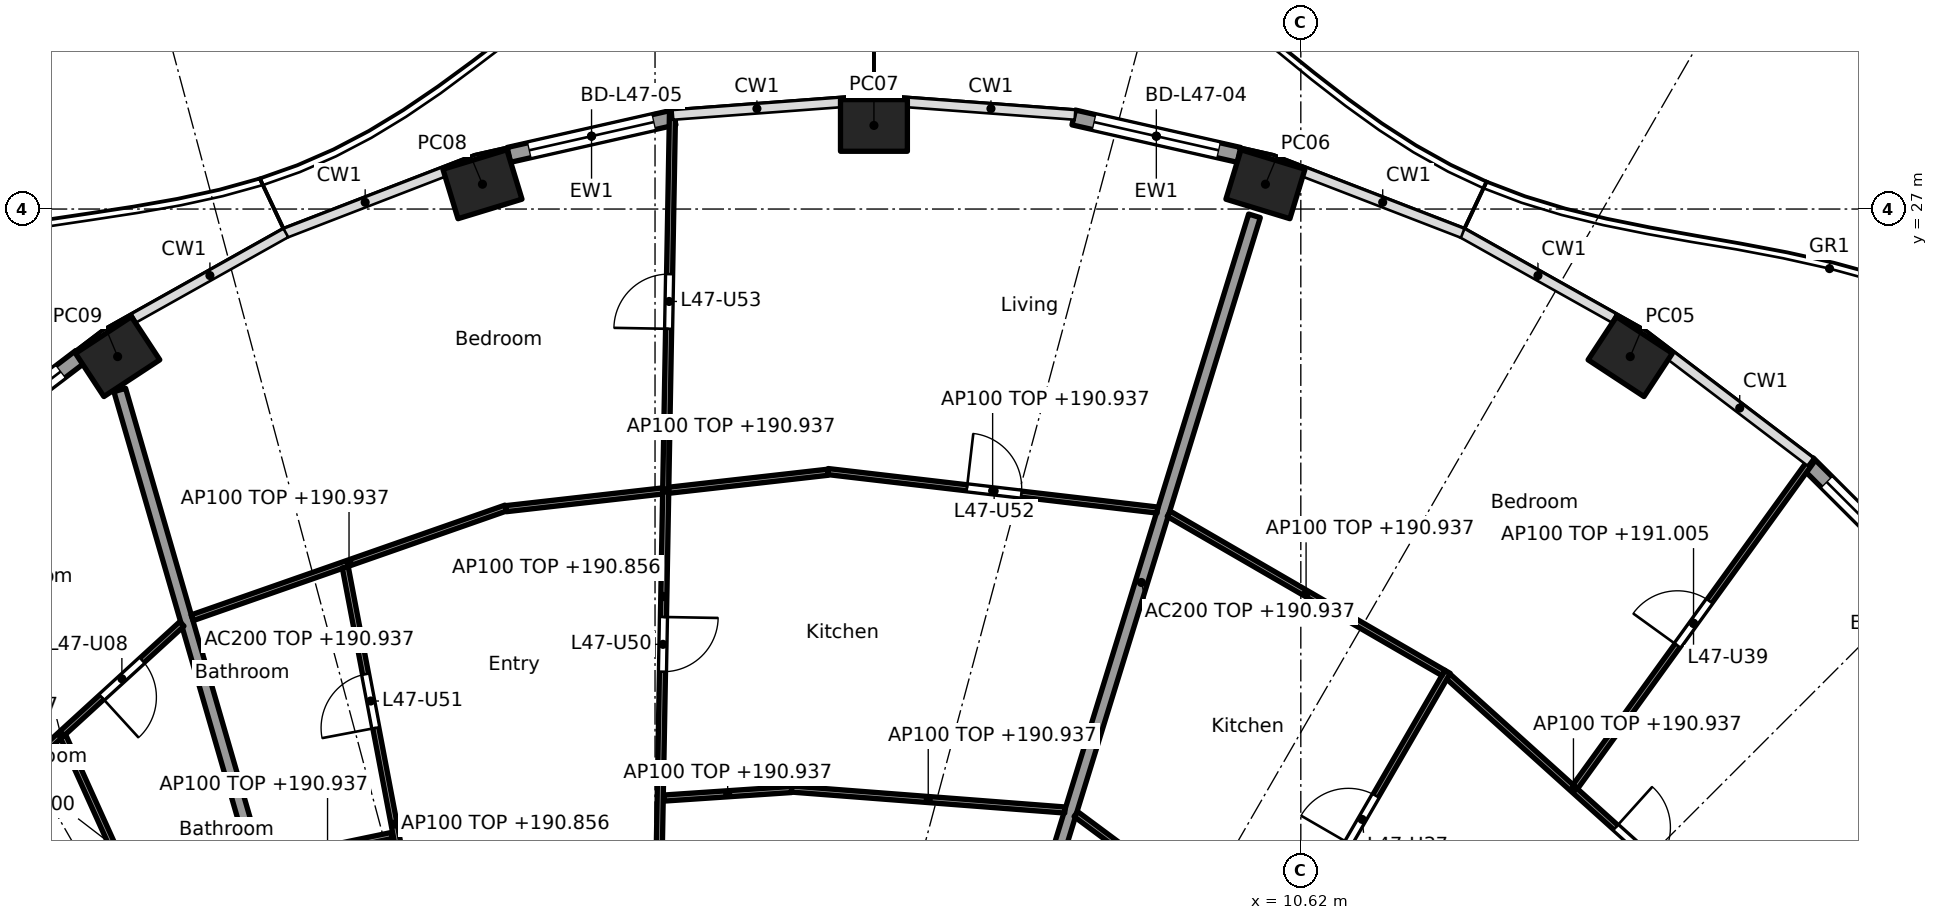
"""IFC4 building model, lengths in metres.
Left out: names, types, materials, properties, quantities, classifications, styles, units other than length and angle.
Written with IfcOpenShell. Run it as: python <this file> out.ifc"""

import sys

from ifc_helpers import new_model, si_unit, direction, frame, frame_2d, origin, origin_2d, place, context, subcontext, project, spatial, rectangle, hollow_rectangle, extrude, element, fill, save


model = new_model("IFC4")
c1 = context("Model", 3, precision=1e-05, world=origin(), true_north=direction((0.0, 1.0)))
c2 = subcontext(c1, "Body", "Model", "MODEL_VIEW")
j1 = project(units=[si_unit("LENGTHUNIT", "METRE"), si_unit("PLANEANGLEUNIT", "RADIAN")], contexts=[c1])
p1 = place(None, origin())
s1 = spatial("IfcSite", under=j1, at=p1, CompositionType="ELEMENT")
p2 = place(p1, origin())
s2 = spatial("IfcBuilding", under=s1, at=p2, CompositionType="ELEMENT")
p3 = place(p2, frame((0.0, 0.0, 188.1)))
s3 = spatial("IfcBuildingStorey", under=s2, at=p3, CompositionType="ELEMENT", Elevation=188.1)
for number, where, z_axis, x_axis in (
    (1, (16.038, 24.573, 0.0), (0.0, 0.0, 1.0), (-0.836, 0.549, 0.0)),
    (2, (10.038, 27.408, 0.0), (0.0, 0.0, 1.0), (-0.957, 0.292, 0.0)),
    (3, (3.6, 28.375, 0.0), (0.0, 0.0, 1.0), (-1.0, 0.0, 0.0)),
    (4, (-2.838, 27.408, 0.0), (0.0, 0.0, 1.0), (-0.957, -0.292, 0.0)),
    (5, (-8.837, 24.573, 0.0), (0.0, 0.0, 1.0), (-0.836, -0.549, 0.0)),
):
    element("IfcColumn", number, at=place(p3, frame(where, z_axis=z_axis, x_axis=x_axis)), inside=s3, PredefinedType="COLUMN", context=c2, shape_type="SweptSolid", body=[
        extrude(hollow_rectangle(XDim=1.1, YDim=0.85, WallThickness=0.036, at=origin_2d()), origin(), (0.0, 0.0, 1.0), 3.7),
    ])
p4 = place(p3, frame((18.959, 22.82, 0.0), z_axis=(0.0, 0.0, 1.0), x_axis=(0.707844845069, -0.706367946122, 0.0)))
e6 = element("IfcWall", 6, at=p4, inside=s3, PredefinedType="SOLIDWALL", context=c2, shape_type="SweptSolid", body=[
    extrude(rectangle(XDim=2.976, YDim=0.25, at=frame_2d((1.488, 0.0))), origin(), (0.0, 0.0, 1.0), 3.44),
])
p5 = place(p4, frame((0.438, 0.0, 0.0)))
e7 = element("IfcOpeningElement", 7, at=p5, cuts=e6, PredefinedType="OPENING", context=c2, shape_type="SweptSolid", body=[
    extrude(rectangle(XDim=2.1, YDim=2.4, at=frame_2d((1.05, 1.2))), frame((0.0, 0.135, 0.0), z_axis=(0.0, -1.0, 0.0), x_axis=(1.0, 0.0, 0.0)), (0.0, 0.0, 1.0), 0.27),
])
p6 = place(p3, frame((6.885, 28.506, 0.0), z_axis=(0.0, 0.0, 1.0), x_axis=(0.975324329911, -0.220776926974, 0.0)))
e8 = element("IfcWall", 8, at=p6, inside=s3, PredefinedType="SOLIDWALL", context=c2, shape_type="SweptSolid", body=[
    extrude(rectangle(XDim=2.788, YDim=0.25, at=frame_2d((1.394, 0.0))), origin(), (0.0, 0.0, 1.0), 3.44),
])
p7 = place(p6, frame((0.344, 0.0, 0.0)))
e9 = element("IfcOpeningElement", 9, at=p7, cuts=e8, PredefinedType="OPENING", context=c2, shape_type="SweptSolid", body=[
    extrude(rectangle(XDim=2.1, YDim=2.4, at=frame_2d((1.05, 1.2))), frame((0.0, 0.135, 0.0), z_axis=(0.0, -1.0, 0.0), x_axis=(1.0, 0.0, 0.0)), (0.0, 0.0, 1.0), 0.27),
])
p8 = place(p3, frame((-2.404, 27.891, 0.0), z_axis=(0.0, 0.0, 1.0), x_axis=(0.975324329911, 0.220776926974, 0.0)))
e10 = element("IfcWall", 10, at=p8, inside=s3, PredefinedType="SOLIDWALL", context=c2, shape_type="SweptSolid", body=[
    extrude(rectangle(XDim=2.788, YDim=0.25, at=frame_2d((1.394, 0.0))), origin(), (0.0, 0.0, 1.0), 3.44),
])
p9 = place(p8, frame((0.344, 0.0, 0.0)))
e11 = element("IfcOpeningElement", 11, at=p9, cuts=e10, PredefinedType="OPENING", context=c2, shape_type="SweptSolid", body=[
    extrude(rectangle(XDim=2.1, YDim=2.4, at=frame_2d((1.05, 1.2))), frame((0.0, 0.135, 0.0), z_axis=(0.0, -1.0, 0.0), x_axis=(1.0, 0.0, 0.0)), (0.0, 0.0, 1.0), 0.27),
])
p10 = place(p3, frame((-11.772, 22.809, 0.0), z_axis=(0.0, 0.0, 1.0), x_axis=(0.796055733703, 0.60522332146, 0.0)))
e12 = element("IfcWall", 12, at=p10, inside=s3, PredefinedType="SOLIDWALL", context=c2, shape_type="SweptSolid", body=[
    extrude(rectangle(XDim=2.917, YDim=0.25, at=frame_2d((1.458, 0.0))), origin(), (0.0, 0.0, 1.0), 3.44),
])
p11 = place(p10, frame((0.408, 0.0, 0.0)))
e13 = element("IfcOpeningElement", 13, at=p11, cuts=e12, PredefinedType="OPENING", context=c2, shape_type="SweptSolid", body=[
    extrude(rectangle(XDim=2.1, YDim=2.4, at=frame_2d((1.05, 1.2))), frame((0.0, 0.135, 0.0), z_axis=(0.0, -1.0, 0.0), x_axis=(1.0, 0.0, 0.0)), (0.0, 0.0, 1.0), 0.27),
])
p12 = place(p3, frame((6.138, 14.83, 0.0), z_axis=(0.0, 0.0, 1.0), x_axis=(0.294818517221, 0.955553264818, 0.0)))
e14 = element("IfcWall", 14, at=p12, inside=s3, PredefinedType="PARTITIONING", context=c2, shape_type="SweptSolid", body=[
    extrude(rectangle(XDim=12.619, YDim=0.2, at=frame_2d((6.31, 0.0))), origin(), (0.0, 0.0, 1.0), 2.837),
])
p13 = place(p3, frame((-6.137, 14.83, 0.0), z_axis=(0.0, 0.0, 1.0), x_axis=(-0.278461169897, 0.96044748782, 0.0)))
e15 = element("IfcWall", 15, at=p13, inside=s3, PredefinedType="PARTITIONING", context=c2, shape_type="SweptSolid", body=[
    extrude(rectangle(XDim=9.573, YDim=0.2, at=frame_2d((4.787, 0.0))), origin(), (0.0, 0.0, 1.0), 2.837),
])
p14 = place(p3, frame((17.162, 15.603, 0.0), z_axis=(0.0, 0.0, 1.0), x_axis=(-0.742790086539, 0.66952437397, 0.0)))
e16 = element("IfcWall", 16, at=p14, inside=s3, PredefinedType="PARTITIONING", context=c2, shape_type="SweptSolid", body=[
    extrude(rectangle(XDim=5.542, YDim=0.1, at=frame_2d((2.771, 0.0))), origin(), (0.0, 0.0, 1.0), 2.837),
])
p15 = place(p14, frame((0.935, 0.0, 0.0)))
e17 = element("IfcOpeningElement", 17, at=p15, cuts=e16, PredefinedType="OPENING", context=c2, shape_type="SweptSolid", body=[
    extrude(rectangle(XDim=0.9, YDim=2.1, at=frame_2d((0.45, 1.05))), frame((0.0, 0.06, 0.0), z_axis=(0.0, -1.0, 0.0), x_axis=(1.0, 0.0, 0.0)), (0.0, 0.0, 1.0), 0.12),
])
p16 = place(p3, frame((15.133, 17.498, 0.0), z_axis=(0.0, 0.0, 1.0), x_axis=(0.586223556927, 0.810149332718, 0.0)))
e18 = element("IfcWall", 18, at=p16, inside=s3, PredefinedType="PARTITIONING", context=c2, shape_type="SweptSolid", body=[
    extrude(rectangle(XDim=6.638, YDim=0.1, at=frame_2d((3.319, 0.0))), origin(), (0.0, 0.0, 1.0), 2.905),
])
p17 = place(p16, frame((2.869, 0.0, 0.0)))
e19 = element("IfcOpeningElement", 19, at=p17, cuts=e18, PredefinedType="OPENING", context=c2, shape_type="SweptSolid", body=[
    extrude(rectangle(XDim=0.9, YDim=2.1, at=frame_2d((0.45, 1.05))), frame((0.0, 0.06, 0.0), z_axis=(0.0, -1.0, 0.0), x_axis=(1.0, 0.0, 0.0)), (0.0, 0.0, 1.0), 0.12),
])
p18 = place(p3, frame((7.708, 10.198, 0.0), z_axis=(0.0, 0.0, 1.0), x_axis=(0.501288100085, 0.865280440501, 0.0)))
e20 = element("IfcWall", 20, at=p18, inside=s3, PredefinedType="PARTITIONING", context=c2, shape_type="SweptSolid", body=[
    extrude(rectangle(XDim=10.623, YDim=0.1, at=frame_2d((5.312, 0.0))), origin(), (0.0, 0.0, 1.0), 2.756),
])
p19 = place(p18, frame((2.082, 0.0, 0.0)))
e21 = element("IfcOpeningElement", 21, at=p19, cuts=e20, PredefinedType="OPENING", context=c2, shape_type="SweptSolid", body=[
    extrude(rectangle(XDim=0.9, YDim=2.1, at=frame_2d((0.45, 1.05))), frame((0.0, 0.06, 0.0), z_axis=(0.0, -1.0, 0.0), x_axis=(1.0, 0.0, 0.0)), (0.0, 0.0, 1.0), 0.12),
])
p20 = place(p18, frame((7.369, 0.0, 0.0)))
e22 = element("IfcOpeningElement", 22, at=p20, cuts=e20, PredefinedType="OPENING", context=c2, shape_type="SweptSolid", body=[
    extrude(rectangle(XDim=0.9, YDim=2.1, at=frame_2d((0.45, 1.05))), frame((0.0, 0.06, 0.0), z_axis=(0.0, -1.0, 0.0), x_axis=(1.0, 0.0, 0.0)), (0.0, 0.0, 1.0), 0.12),
])
p21 = place(p3, frame((10.207, 14.61, 0.0), z_axis=(0.0, 0.0, 1.0), x_axis=(-0.802769141821, 0.596289950394, 0.0)))
e23 = element("IfcWall", 23, at=p21, inside=s3, PredefinedType="PARTITIONING", context=c2, shape_type="SweptSolid", body=[
    extrude(rectangle(XDim=4.092, YDim=0.1, at=frame_2d((2.046, 0.0))), origin(), (0.0, 0.0, 1.0), 2.837),
])
p22 = place(p3, frame((12.965, 19.371, 0.0), z_axis=(0.0, 0.0, 1.0), x_axis=(-0.865286427811, 0.501277765163, 0.0)))
e24 = element("IfcWall", 24, at=p22, inside=s3, PredefinedType="PARTITIONING", context=c2, shape_type="SweptSolid", body=[
    extrude(rectangle(XDim=5.22, YDim=0.1, at=frame_2d((2.61, 0.0))), origin(), (0.0, 0.0, 1.0), 2.837),
])
p23 = place(p3, frame((6.741, 17.117, 0.0), z_axis=(0.0, 0.0, 1.0), x_axis=(-0.997078320723, 0.076386008825, 0.0)))
e25 = element("IfcWall", 25, at=p23, inside=s3, PredefinedType="PARTITIONING", context=c2, shape_type="SweptSolid", body=[
    extrude(rectangle(XDim=4.51, YDim=0.1, at=frame_2d((2.255, 0.0))), origin(), (0.0, 0.0, 1.0), 2.837),
])
p24 = place(p3, frame((8.262, 22.05, 0.0), z_axis=(0.0, 0.0, 1.0), x_axis=(-0.993250089265, 0.115992500516, 0.0)))
e26 = element("IfcWall", 26, at=p24, inside=s3, PredefinedType="PARTITIONING", context=c2, shape_type="SweptSolid", body=[
    extrude(rectangle(XDim=5.458, YDim=0.1, at=frame_2d((2.729, 0.0))), origin(), (0.0, 0.0, 1.0), 2.837),
])
p25 = place(p24, frame((2.254, 0.0, 0.0)))
e27 = element("IfcOpeningElement", 27, at=p25, cuts=e26, PredefinedType="OPENING", context=c2, shape_type="SweptSolid", body=[
    extrude(rectangle(XDim=0.9, YDim=2.1, at=frame_2d((0.45, 1.05))), frame((0.0, 0.06, 0.0), z_axis=(0.0, -1.0, 0.0), x_axis=(1.0, 0.0, 0.0)), (0.0, 0.0, 1.0), 0.12),
])
p26 = place(p3, frame((2.244, 17.455, 0.0), z_axis=(0.0, 0.0, 1.0), x_axis=(-0.997756833447, -0.06694252243, 0.0)))
e28 = element("IfcWall", 28, at=p26, inside=s3, PredefinedType="PARTITIONING", context=c2, shape_type="SweptSolid", body=[
    extrude(rectangle(XDim=2.104, YDim=0.1, at=frame_2d((1.052, 0.0))), origin(), (0.0, 0.0, 1.0), 2.837),
])
p27 = place(p3, frame((2.842, 22.671, 0.0), z_axis=(0.0, 0.0, 1.0), x_axis=(-0.993660315081, -0.112424099879, 0.0)))
e29 = element("IfcWall", 29, at=p27, inside=s3, PredefinedType="PARTITIONING", context=c2, shape_type="SweptSolid", body=[
    extrude(rectangle(XDim=5.325, YDim=0.1, at=frame_2d((2.662, 0.0))), origin(), (0.0, 0.0, 1.0), 2.837),
])
p28 = place(p3, frame((0.002, 12.665, 0.0), z_axis=(0.0, 0.0, 1.0), x_axis=(0.01792079652, 0.999839409631, 0.0)))
e30 = element("IfcWall", 30, at=p28, inside=s3, PredefinedType="PARTITIONING", context=c2, shape_type="SweptSolid", body=[
    extrude(rectangle(XDim=15.926, YDim=0.1, at=frame_2d((7.963, 0.0))), origin(), (0.0, 0.0, 1.0), 2.756),
])
p29 = place(p28, frame((1.873, 0.0, 0.0)))
e31 = element("IfcOpeningElement", 31, at=p29, cuts=e30, PredefinedType="OPENING", context=c2, shape_type="SweptSolid", body=[
    extrude(rectangle(XDim=0.9, YDim=2.1, at=frame_2d((0.45, 1.05))), frame((0.0, 0.06, 0.0), z_axis=(0.0, -1.0, 0.0), x_axis=(1.0, 0.0, 0.0)), (0.0, 0.0, 1.0), 0.12),
])
p30 = place(p28, frame((6.728, 0.0, 0.0)))
e32 = element("IfcOpeningElement", 32, at=p30, cuts=e30, PredefinedType="OPENING", context=c2, shape_type="SweptSolid", body=[
    extrude(rectangle(XDim=0.9, YDim=2.1, at=frame_2d((0.45, 1.05))), frame((0.0, 0.06, 0.0), z_axis=(0.0, -1.0, 0.0), x_axis=(1.0, 0.0, 0.0)), (0.0, 0.0, 1.0), 0.12),
])
p31 = place(p28, frame((12.367, 0.0, 0.0)))
e33 = element("IfcOpeningElement", 33, at=p31, cuts=e30, PredefinedType="OPENING", context=c2, shape_type="SweptSolid", body=[
    extrude(rectangle(XDim=0.9, YDim=2.1, at=frame_2d((0.45, 1.05))), frame((0.0, 0.06, 0.0), z_axis=(0.0, -1.0, 0.0), x_axis=(1.0, 0.0, 0.0)), (0.0, 0.0, 1.0), 0.12),
])
p32 = place(p3, frame((-2.452, 22.083, 0.0), z_axis=(0.0, 0.0, 1.0), x_axis=(-0.943918212431, -0.330179357684, 0.0)))
e34 = element("IfcWall", 34, at=p32, inside=s3, PredefinedType="PARTITIONING", context=c2, shape_type="SweptSolid", body=[
    extrude(rectangle(XDim=5.467, YDim=0.1, at=frame_2d((2.734, 0.0))), origin(), (0.0, 0.0, 1.0), 2.837),
])
p33 = place(p3, frame((-3.488, 12.663, 0.0), z_axis=(0.0, 0.0, 1.0), x_axis=(-0.186783185485, 0.982401161247, 0.0)))
e35 = element("IfcWall", 35, at=p33, inside=s3, PredefinedType="PARTITIONING", context=c2, shape_type="SweptSolid", body=[
    extrude(rectangle(XDim=8.595, YDim=0.1, at=frame_2d((4.298, 0.0))), origin(), (0.0, 0.0, 1.0), 2.756),
])
p34 = place(p33, frame((0.35, 0.0, 0.0)))
e36 = element("IfcOpeningElement", 36, at=p34, cuts=e35, PredefinedType="OPENING", context=c2, shape_type="SweptSolid", body=[
    extrude(rectangle(XDim=0.9, YDim=2.1, at=frame_2d((0.45, 1.05))), frame((0.0, 0.06, 0.0), z_axis=(0.0, -1.0, 0.0), x_axis=(1.0, 0.0, 0.0)), (0.0, 0.0, 1.0), 0.12),
])
p35 = place(p33, frame((5.908, 0.0, 0.0)))
e37 = element("IfcOpeningElement", 37, at=p35, cuts=e35, PredefinedType="OPENING", context=c2, shape_type="SweptSolid", body=[
    extrude(rectangle(XDim=0.9, YDim=2.1, at=frame_2d((0.45, 1.05))), frame((0.0, 0.06, 0.0), z_axis=(0.0, -1.0, 0.0), x_axis=(1.0, 0.0, 0.0)), (0.0, 0.0, 1.0), 0.12),
])
p36 = place(p3, frame((-4.324, 16.699, 0.0), z_axis=(0.0, 0.0, 1.0), x_axis=(-0.978909151576, -0.204296042448, 0.0)))
e38 = element("IfcWall", 38, at=p36, inside=s3, PredefinedType="PARTITIONING", context=c2, shape_type="SweptSolid", body=[
    extrude(rectangle(XDim=2.168, YDim=0.1, at=frame_2d((1.084, 0.0))), origin(), (0.0, 0.0, 1.0), 2.837),
])
p37 = place(p3, frame((-7.781, 20.178, 0.0), z_axis=(0.0, 0.0, 1.0), x_axis=(-0.73807320557, -0.674720640872, 0.0)))
e39 = element("IfcWall", 39, at=p37, inside=s3, PredefinedType="PARTITIONING", context=c2, shape_type="SweptSolid", body=[
    extrude(rectangle(XDim=5.399, YDim=0.1, at=frame_2d((2.699, 0.0))), origin(), (0.0, 0.0, 1.0), 2.837),
])
p38 = place(p37, frame((0.887, 0.0, 0.0)))
e40 = element("IfcOpeningElement", 40, at=p38, cuts=e39, PredefinedType="OPENING", context=c2, shape_type="SweptSolid", body=[
    extrude(rectangle(XDim=0.9, YDim=2.1, at=frame_2d((0.45, 1.05))), frame((0.0, 0.06, 0.0), z_axis=(0.0, -1.0, 0.0), x_axis=(1.0, 0.0, 0.0)), (0.0, 0.0, 1.0), 0.12),
])
p39 = place(p3, frame((-8.125, 14.765, 0.0), z_axis=(0.0, 0.0, 1.0), x_axis=(-0.411745679848, 0.911298795745, 0.0)))
e41 = element("IfcWall", 41, at=p39, inside=s3, PredefinedType="PARTITIONING", context=c2, shape_type="SweptSolid", body=[
    extrude(rectangle(XDim=3.909, YDim=0.1, at=frame_2d((1.955, 0.0))), origin(), (0.0, 0.0, 1.0), 3.44),
])
p40 = place(p5, origin())
e42 = element("IfcDoor", 42, at=p40, inside=s3, OperationType="SLIDING_TO_LEFT", PredefinedType="DOOR", context=c2, shape_type="SweptSolid", body=[
    extrude(rectangle(XDim=2.1, YDim=2.4, at=frame_2d((1.05, 1.2))), frame((0.0, 0.025, 0.0), z_axis=(0.0, -1.0, 0.0), x_axis=(1.0, 0.0, 0.0)), (0.0, 0.0, 1.0), 0.05),
])
fill(e7, e42)
p41 = place(p7, origin())
e43 = element("IfcDoor", 43, at=p41, inside=s3, OperationType="SLIDING_TO_LEFT", PredefinedType="DOOR", context=c2, shape_type="SweptSolid", body=[
    extrude(rectangle(XDim=2.1, YDim=2.4, at=frame_2d((1.05, 1.2))), frame((0.0, 0.025, 0.0), z_axis=(0.0, -1.0, 0.0), x_axis=(1.0, 0.0, 0.0)), (0.0, 0.0, 1.0), 0.05),
])
fill(e9, e43)
p42 = place(p9, origin())
e44 = element("IfcDoor", 44, at=p42, inside=s3, OperationType="SLIDING_TO_LEFT", PredefinedType="DOOR", context=c2, shape_type="SweptSolid", body=[
    extrude(rectangle(XDim=2.1, YDim=2.4, at=frame_2d((1.05, 1.2))), frame((0.0, 0.025, 0.0), z_axis=(0.0, -1.0, 0.0), x_axis=(1.0, 0.0, 0.0)), (0.0, 0.0, 1.0), 0.05),
])
fill(e11, e44)
p43 = place(p11, origin())
e45 = element("IfcDoor", 45, at=p43, inside=s3, OperationType="SLIDING_TO_LEFT", PredefinedType="DOOR", context=c2, shape_type="SweptSolid", body=[
    extrude(rectangle(XDim=2.1, YDim=2.4, at=frame_2d((1.05, 1.2))), frame((0.0, 0.025, 0.0), z_axis=(0.0, -1.0, 0.0), x_axis=(1.0, 0.0, 0.0)), (0.0, 0.0, 1.0), 0.05),
])
fill(e13, e45)
p44 = place(p38, origin())
e46 = element("IfcDoor", 46, at=p44, inside=s3, OperationType="SINGLE_SWING_RIGHT", PredefinedType="DOOR", context=c2, shape_type="SweptSolid", body=[
    extrude(rectangle(XDim=0.9, YDim=2.1, at=frame_2d((0.45, 1.05))), frame((0.0, 0.025, 0.0), z_axis=(0.0, -1.0, 0.0), x_axis=(1.0, 0.0, 0.0)), (0.0, 0.0, 1.0), 0.05),
])
fill(e40, e46)
p45 = place(p20, origin())
e47 = element("IfcDoor", 47, at=p45, inside=s3, OperationType="SINGLE_SWING_LEFT", PredefinedType="DOOR", context=c2, shape_type="SweptSolid", body=[
    extrude(rectangle(XDim=0.9, YDim=2.1, at=frame_2d((0.45, 1.05))), frame((0.0, 0.025, 0.0), z_axis=(0.0, -1.0, 0.0), x_axis=(1.0, 0.0, 0.0)), (0.0, 0.0, 1.0), 0.05),
])
fill(e22, e47)
p46 = place(p15, frame((0.9, 0.0, 0.0), x_axis=(-1.0, 0.0, 0.0)))
e48 = element("IfcDoor", 48, at=p46, inside=s3, OperationType="SINGLE_SWING_LEFT", PredefinedType="DOOR", context=c2, shape_type="SweptSolid", body=[
    extrude(rectangle(XDim=0.9, YDim=2.1, at=frame_2d((0.45, 1.05))), frame((0.0, 0.025, 0.0), z_axis=(0.0, -1.0, 0.0), x_axis=(1.0, 0.0, 0.0)), (0.0, 0.0, 1.0), 0.05),
])
fill(e17, e48)
p47 = place(p17, origin())
e49 = element("IfcDoor", 49, at=p47, inside=s3, OperationType="SINGLE_SWING_LEFT", PredefinedType="DOOR", context=c2, shape_type="SweptSolid", body=[
    extrude(rectangle(XDim=0.9, YDim=2.1, at=frame_2d((0.45, 1.05))), frame((0.0, 0.025, 0.0), z_axis=(0.0, -1.0, 0.0), x_axis=(1.0, 0.0, 0.0)), (0.0, 0.0, 1.0), 0.05),
])
fill(e19, e49)
p48 = place(p30, frame((0.9, 0.0, 0.0), x_axis=(-1.0, 0.0, 0.0)))
e50 = element("IfcDoor", 50, at=p48, inside=s3, OperationType="SINGLE_SWING_LEFT", PredefinedType="DOOR", context=c2, shape_type="SweptSolid", body=[
    extrude(rectangle(XDim=0.9, YDim=2.1, at=frame_2d((0.45, 1.05))), frame((0.0, 0.025, 0.0), z_axis=(0.0, -1.0, 0.0), x_axis=(1.0, 0.0, 0.0)), (0.0, 0.0, 1.0), 0.05),
])
fill(e32, e50)
p49 = place(p35, origin())
e51 = element("IfcDoor", 51, at=p49, inside=s3, OperationType="SINGLE_SWING_LEFT", PredefinedType="DOOR", context=c2, shape_type="SweptSolid", body=[
    extrude(rectangle(XDim=0.9, YDim=2.1, at=frame_2d((0.45, 1.05))), frame((0.0, 0.025, 0.0), z_axis=(0.0, -1.0, 0.0), x_axis=(1.0, 0.0, 0.0)), (0.0, 0.0, 1.0), 0.05),
])
fill(e37, e51)
p50 = place(p25, frame((0.9, 0.0, 0.0), x_axis=(-1.0, 0.0, 0.0)))
e52 = element("IfcDoor", 52, at=p50, inside=s3, OperationType="SINGLE_SWING_LEFT", PredefinedType="DOOR", context=c2, shape_type="SweptSolid", body=[
    extrude(rectangle(XDim=0.9, YDim=2.1, at=frame_2d((0.45, 1.05))), frame((0.0, 0.025, 0.0), z_axis=(0.0, -1.0, 0.0), x_axis=(1.0, 0.0, 0.0)), (0.0, 0.0, 1.0), 0.05),
])
fill(e27, e52)
p51 = place(p31, origin())
e53 = element("IfcDoor", 53, at=p51, inside=s3, OperationType="SINGLE_SWING_LEFT", PredefinedType="DOOR", context=c2, shape_type="SweptSolid", body=[
    extrude(rectangle(XDim=0.9, YDim=2.1, at=frame_2d((0.45, 1.05))), frame((0.0, 0.025, 0.0), z_axis=(0.0, -1.0, 0.0), x_axis=(1.0, 0.0, 0.0)), (0.0, 0.0, 1.0), 0.05),
])
fill(e33, e53)
save(model, sys.argv[1])
